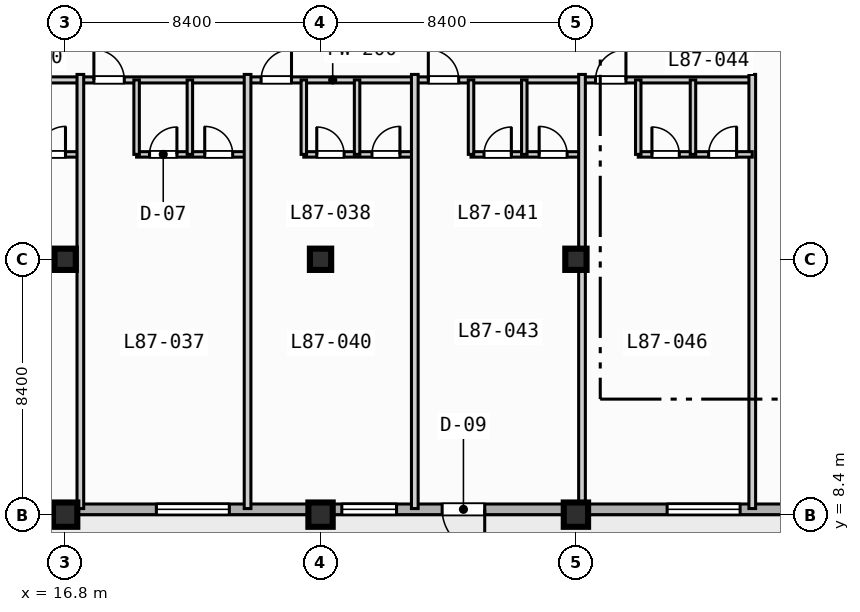
"""IFC4 building model, lengths in metres.
Left out: names, types, materials, properties, quantities, classifications, styles, units other than length and angle.
Written with IfcOpenShell. Run it as: python <this file> out.ifc"""

import sys

from ifc_helpers import new_model, si_unit, direction, frame, frame_2d, origin, origin_2d, place, context, subcontext, project, spatial, rectangle, extrude, element, fill, save


model = new_model("IFC4")
c1 = context("Model", 3, precision=1e-05, world=origin(), true_north=direction((0.0, 1.0)))
c2 = subcontext(c1, "Body", "Model", "MODEL_VIEW")
j1 = project(units=[si_unit("LENGTHUNIT", "METRE"), si_unit("PLANEANGLEUNIT", "RADIAN")], contexts=[c1])
p1 = place(None, origin())
s1 = spatial("IfcSite", under=j1, at=p1, CompositionType="ELEMENT")
p2 = place(p1, origin())
s2 = spatial("IfcBuilding", under=s1, at=p2, CompositionType="ELEMENT")
p3 = place(p2, frame((0.0, 0.0, 351.5)))
s3 = spatial("IfcBuildingStorey", under=s2, at=p3, CompositionType="ELEMENT", Elevation=351.5)
p4 = place(p3, frame((16.8, 8.4, 0.0), z_axis=(0.0, 0.0, 1.0), x_axis=(1.0, 0.0, 0.0)))
e1 = element("IfcColumn", 1, at=p4, inside=s3, PredefinedType="COLUMN", context=c2, shape_type="SweptSolid", body=[
    extrude(rectangle(XDim=0.8, YDim=0.8, at=origin_2d()), origin(), (0.0, 0.0, 1.0), 3.9),
])
p5 = place(p3, frame((16.8, 16.8, 0.0), z_axis=(0.0, 0.0, 1.0), x_axis=(1.0, 0.0, 0.0)))
e2 = element("IfcColumn", 2, at=p5, inside=s3, PredefinedType="COLUMN", context=c2, shape_type="SweptSolid", body=[
    extrude(rectangle(XDim=0.7, YDim=0.7, at=origin_2d()), origin(), (0.0, 0.0, 1.0), 3.9),
])
p6 = place(p3, frame((25.2, 8.4, 0.0), z_axis=(0.0, 0.0, 1.0), x_axis=(1.0, 0.0, 0.0)))
e3 = element("IfcColumn", 3, at=p6, inside=s3, PredefinedType="COLUMN", context=c2, shape_type="SweptSolid", body=[
    extrude(rectangle(XDim=0.8, YDim=0.8, at=origin_2d()), origin(), (0.0, 0.0, 1.0), 3.9),
])
p7 = place(p3, frame((25.2, 16.8, 0.0), z_axis=(0.0, 0.0, 1.0), x_axis=(1.0, 0.0, 0.0)))
e4 = element("IfcColumn", 4, at=p7, inside=s3, PredefinedType="COLUMN", context=c2, shape_type="SweptSolid", body=[
    extrude(rectangle(XDim=0.7, YDim=0.7, at=origin_2d()), origin(), (0.0, 0.0, 1.0), 3.9),
])
p8 = place(p3, frame((33.6, 8.4, 0.0), z_axis=(0.0, 0.0, 1.0), x_axis=(1.0, 0.0, 0.0)))
e5 = element("IfcColumn", 5, at=p8, inside=s3, PredefinedType="COLUMN", context=c2, shape_type="SweptSolid", body=[
    extrude(rectangle(XDim=0.8, YDim=0.8, at=origin_2d()), origin(), (0.0, 0.0, 1.0), 3.9),
])
p9 = place(p3, frame((33.6, 16.8, 0.0), z_axis=(0.0, 0.0, 1.0), x_axis=(1.0, 0.0, 0.0)))
e6 = element("IfcColumn", 6, at=p9, inside=s3, PredefinedType="COLUMN", context=c2, shape_type="SweptSolid", body=[
    extrude(rectangle(XDim=0.7, YDim=0.7, at=origin_2d()), origin(), (0.0, 0.0, 1.0), 3.9),
])
p10 = place(p3, frame((64.025, 8.575, 0.0), z_axis=(0.0, 0.0, 1.0), x_axis=(-1.0, 0.0, 0.0)))
e7 = element("IfcWall", 7, at=p10, inside=s3, PredefinedType="STANDARD", context=c2, shape_type="SweptSolid", body=[
    extrude(rectangle(XDim=52.45, YDim=0.35, at=frame_2d((26.225, 0.0))), origin(), (0.0, 0.0, 1.0), 3.67),
])
p11 = place(p10, frame((33.425, 0.0, 0.0)))
e8 = element("IfcOpeningElement", 8, at=p11, cuts=e7, PredefinedType="OPENING", context=c2, shape_type="SweptSolid", body=[
    extrude(rectangle(XDim=1.4, YDim=2.2, at=frame_2d((0.7, 1.1))), frame((0.0, 0.185, 0.0), z_axis=(0.0, -1.0, 0.0), x_axis=(1.0, 0.0, 0.0)), (0.0, 0.0, 1.0), 0.37),
])
p12 = place(p10, frame((41.825, 0.0, 0.85)))
e9 = element("IfcOpeningElement", 9, at=p12, cuts=e7, PredefinedType="OPENING", context=c2, shape_type="SweptSolid", body=[
    extrude(rectangle(XDim=2.4, YDim=1.95, at=frame_2d((1.2, 0.975))), frame((0.0, 0.185, 0.0), z_axis=(0.0, -1.0, 0.0), x_axis=(1.0, 0.0, 0.0)), (0.0, 0.0, 1.0), 0.37),
])
p13 = place(p10, frame((25.025, 0.0, 0.85)))
e10 = element("IfcOpeningElement", 10, at=p13, cuts=e7, PredefinedType="OPENING", context=c2, shape_type="SweptSolid", body=[
    extrude(rectangle(XDim=2.4, YDim=1.95, at=frame_2d((1.2, 0.975))), frame((0.0, 0.185, 0.0), z_axis=(0.0, -1.0, 0.0), x_axis=(1.0, 0.0, 0.0)), (0.0, 0.0, 1.0), 0.37),
])
p14 = place(p10, frame((16.925, 0.0, 0.85)))
e11 = element("IfcOpeningElement", 11, at=p14, cuts=e7, PredefinedType="OPENING", context=c2, shape_type="SweptSolid", body=[
    extrude(rectangle(XDim=1.8, YDim=1.8, at=frame_2d((0.9, 0.9))), frame((0.0, 0.185, 0.0), z_axis=(0.0, -1.0, 0.0), x_axis=(1.0, 0.0, 0.0)), (0.0, 0.0, 1.0), 0.37),
])
p15 = place(p10, frame((48.575, 0.0, 0.85)))
e12 = element("IfcOpeningElement", 12, at=p15, cuts=e7, PredefinedType="OPENING", context=c2, shape_type="SweptSolid", body=[
    extrude(rectangle(XDim=1.8, YDim=1.8, at=frame_2d((0.9, 0.9))), frame((0.0, 0.185, 0.0), z_axis=(0.0, -1.0, 0.0), x_axis=(1.0, 0.0, 0.0)), (0.0, 0.0, 1.0), 0.37),
])
p16 = place(p10, frame((36.325, 0.0, 0.85)))
e13 = element("IfcOpeningElement", 13, at=p16, cuts=e7, PredefinedType="OPENING", context=c2, shape_type="SweptSolid", body=[
    extrude(rectangle(XDim=1.8, YDim=1.8, at=frame_2d((0.9, 0.9))), frame((0.0, 0.185, 0.0), z_axis=(0.0, -1.0, 0.0), x_axis=(1.0, 0.0, 0.0)), (0.0, 0.0, 1.0), 0.37),
])
p17 = place(p3, frame((11.8, 22.7, 0.0), z_axis=(0.0, 0.0, 1.0), x_axis=(1.0, 0.0, 0.0)))
e14 = element("IfcWall", 14, at=p17, inside=s3, PredefinedType="PARTITIONING", context=c2, shape_type="SweptSolid", body=[
    extrude(rectangle(XDim=27.6, YDim=0.2, at=frame_2d((13.8, 0.0))), origin(), (0.0, 0.0, 1.0), 3.67),
])
p18 = place(p17, frame((0.445, 0.0, 0.0)))
e15 = element("IfcOpeningElement", 15, at=p18, cuts=e14, PredefinedType="OPENING", context=c2, shape_type="SweptSolid", body=[
    extrude(rectangle(XDim=1.0, YDim=2.15, at=frame_2d((0.5, 1.075))), frame((0.0, 0.11, 0.0), z_axis=(0.0, -1.0, 0.0), x_axis=(1.0, 0.0, 0.0)), (0.0, 0.0, 1.0), 0.22),
])
p19 = place(p17, frame((5.945, 0.0, 0.0)))
e16 = element("IfcOpeningElement", 16, at=p19, cuts=e14, PredefinedType="OPENING", context=c2, shape_type="SweptSolid", body=[
    extrude(rectangle(XDim=1.0, YDim=2.15, at=frame_2d((0.5, 1.075))), frame((0.0, 0.11, 0.0), z_axis=(0.0, -1.0, 0.0), x_axis=(1.0, 0.0, 0.0)), (0.0, 0.0, 1.0), 0.22),
])
p20 = place(p17, frame((11.445, 0.0, 0.0)))
e17 = element("IfcOpeningElement", 17, at=p20, cuts=e14, PredefinedType="OPENING", context=c2, shape_type="SweptSolid", body=[
    extrude(rectangle(XDim=1.0, YDim=2.15, at=frame_2d((0.5, 1.075))), frame((0.0, 0.11, 0.0), z_axis=(0.0, -1.0, 0.0), x_axis=(1.0, 0.0, 0.0)), (0.0, 0.0, 1.0), 0.22),
])
p21 = place(p17, frame((16.945, 0.0, 0.0)))
e18 = element("IfcOpeningElement", 18, at=p21, cuts=e14, PredefinedType="OPENING", context=c2, shape_type="SweptSolid", body=[
    extrude(rectangle(XDim=1.0, YDim=2.15, at=frame_2d((0.5, 1.075))), frame((0.0, 0.11, 0.0), z_axis=(0.0, -1.0, 0.0), x_axis=(1.0, 0.0, 0.0)), (0.0, 0.0, 1.0), 0.22),
])
p22 = place(p17, frame((22.445, 0.0, 0.0)))
e19 = element("IfcOpeningElement", 19, at=p22, cuts=e14, PredefinedType="OPENING", context=c2, shape_type="SweptSolid", body=[
    extrude(rectangle(XDim=1.0, YDim=2.15, at=frame_2d((0.5, 1.075))), frame((0.0, 0.11, 0.0), z_axis=(0.0, -1.0, 0.0), x_axis=(1.0, 0.0, 0.0)), (0.0, 0.0, 1.0), 0.22),
])
p23 = place(p3, frame((13.65, 20.25, 0.0), z_axis=(0.0, 0.0, 1.0), x_axis=(1.0, 0.0, 0.0)))
e20 = element("IfcWall", 20, at=p23, inside=s3, PredefinedType="PLUMBINGWALL", context=c2, shape_type="SweptSolid", body=[
    extrude(rectangle(XDim=3.65, YDim=0.18, at=frame_2d((1.825, 0.0))), origin(), (0.0, 0.0, 1.0), 3.67),
])
p24 = place(p23, frame((0.426, 0.0, 0.0)))
e21 = element("IfcOpeningElement", 21, at=p24, cuts=e20, PredefinedType="OPENING", context=c2, shape_type="SweptSolid", body=[
    extrude(rectangle(XDim=0.9, YDim=2.1, at=frame_2d((0.45, 1.05))), frame((0.0, 0.1, 0.0), z_axis=(0.0, -1.0, 0.0), x_axis=(1.0, 0.0, 0.0)), (0.0, 0.0, 1.0), 0.2),
])
p25 = place(p23, frame((2.241, 0.0, 0.0)))
e22 = element("IfcOpeningElement", 22, at=p25, cuts=e20, PredefinedType="OPENING", context=c2, shape_type="SweptSolid", body=[
    extrude(rectangle(XDim=0.92, YDim=2.1, at=frame_2d((0.46, 1.05))), frame((0.0, 0.1, 0.0), z_axis=(0.0, -1.0, 0.0), x_axis=(1.0, 0.0, 0.0)), (0.0, 0.0, 1.0), 0.2),
])
p26 = place(p3, frame((17.3, 8.6, 0.0), z_axis=(0.0, 0.0, 1.0), x_axis=(0.0, 1.0, 0.0)))
e23 = element("IfcWall", 23, at=p26, inside=s3, PredefinedType="PARTITIONING", context=c2, shape_type="SweptSolid", body=[
    extrude(rectangle(XDim=14.28, YDim=0.22, at=frame_2d((7.14, 0.0))), origin(), (0.0, 0.0, 1.0), 3.67),
])
p27 = place(p3, frame((19.15, 20.25, 0.0), z_axis=(0.0, 0.0, 1.0), x_axis=(1.0, 0.0, 0.0)))
e24 = element("IfcWall", 24, at=p27, inside=s3, PredefinedType="PLUMBINGWALL", context=c2, shape_type="SweptSolid", body=[
    extrude(rectangle(XDim=3.65, YDim=0.18, at=frame_2d((1.825, 0.0))), origin(), (0.0, 0.0, 1.0), 3.67),
])
p28 = place(p27, frame((0.426, 0.0, 0.0)))
e25 = element("IfcOpeningElement", 25, at=p28, cuts=e24, PredefinedType="OPENING", context=c2, shape_type="SweptSolid", body=[
    extrude(rectangle(XDim=0.9, YDim=2.1, at=frame_2d((0.45, 1.05))), frame((0.0, 0.1, 0.0), z_axis=(0.0, -1.0, 0.0), x_axis=(1.0, 0.0, 0.0)), (0.0, 0.0, 1.0), 0.2),
])
p29 = place(p27, frame((2.241, 0.0, 0.0)))
e26 = element("IfcOpeningElement", 26, at=p29, cuts=e24, PredefinedType="OPENING", context=c2, shape_type="SweptSolid", body=[
    extrude(rectangle(XDim=0.92, YDim=2.1, at=frame_2d((0.46, 1.05))), frame((0.0, 0.1, 0.0), z_axis=(0.0, -1.0, 0.0), x_axis=(1.0, 0.0, 0.0)), (0.0, 0.0, 1.0), 0.2),
])
p30 = place(p3, frame((19.15, 20.25, 0.0), z_axis=(0.0, 0.0, 1.0), x_axis=(0.0, 1.0, 0.0)))
e27 = element("IfcWall", 27, at=p30, inside=s3, PredefinedType="PLUMBINGWALL", context=c2, shape_type="SweptSolid", body=[
    extrude(rectangle(XDim=2.45, YDim=0.18, at=frame_2d((1.225, 0.0))), origin(), (0.0, 0.0, 1.0), 3.67),
])
p31 = place(p3, frame((20.902, 20.25, 0.0), z_axis=(0.0, 0.0, 1.0), x_axis=(0.0, 1.0, 0.0)))
e28 = element("IfcWall", 28, at=p31, inside=s3, PredefinedType="PLUMBINGWALL", context=c2, shape_type="SweptSolid", body=[
    extrude(rectangle(XDim=2.45, YDim=0.18, at=frame_2d((1.225, 0.0))), origin(), (0.0, 0.0, 1.0), 3.253),
])
p32 = place(p3, frame((22.8, 8.6, 0.0), z_axis=(0.0, 0.0, 1.0), x_axis=(0.0, 1.0, 0.0)))
e29 = element("IfcWall", 29, at=p32, inside=s3, PredefinedType="PARTITIONING", context=c2, shape_type="SweptSolid", body=[
    extrude(rectangle(XDim=14.28, YDim=0.22, at=frame_2d((7.14, 0.0))), origin(), (0.0, 0.0, 1.0), 3.67),
])
p33 = place(p3, frame((24.65, 20.25, 0.0), z_axis=(0.0, 0.0, 1.0), x_axis=(1.0, 0.0, 0.0)))
e30 = element("IfcWall", 30, at=p33, inside=s3, PredefinedType="PLUMBINGWALL", context=c2, shape_type="SweptSolid", body=[
    extrude(rectangle(XDim=3.65, YDim=0.18, at=frame_2d((1.825, 0.0))), origin(), (0.0, 0.0, 1.0), 3.67),
])
p34 = place(p33, frame((0.426, 0.0, 0.0)))
e31 = element("IfcOpeningElement", 31, at=p34, cuts=e30, PredefinedType="OPENING", context=c2, shape_type="SweptSolid", body=[
    extrude(rectangle(XDim=0.9, YDim=2.1, at=frame_2d((0.45, 1.05))), frame((0.0, 0.1, 0.0), z_axis=(0.0, -1.0, 0.0), x_axis=(1.0, 0.0, 0.0)), (0.0, 0.0, 1.0), 0.2),
])
p35 = place(p33, frame((2.241, 0.0, 0.0)))
e32 = element("IfcOpeningElement", 32, at=p35, cuts=e30, PredefinedType="OPENING", context=c2, shape_type="SweptSolid", body=[
    extrude(rectangle(XDim=0.92, YDim=2.1, at=frame_2d((0.46, 1.05))), frame((0.0, 0.1, 0.0), z_axis=(0.0, -1.0, 0.0), x_axis=(1.0, 0.0, 0.0)), (0.0, 0.0, 1.0), 0.2),
])
for number, where, z_axis, x_axis in (
    (33, (24.65, 20.25, 0.0), (0.0, 0.0, 1.0), (0.0, 1.0, 0.0)),
    (34, (26.402, 20.25, 0.0), (0.0, 0.0, 1.0), (0.0, 1.0, 0.0)),
):
    element("IfcWall", number, at=place(p3, frame(where, z_axis=z_axis, x_axis=x_axis)), inside=s3, PredefinedType="PLUMBINGWALL", context=c2, shape_type="SweptSolid", body=[
        extrude(rectangle(XDim=2.45, YDim=0.18, at=frame_2d((1.225, 0.0))), origin(), (0.0, 0.0, 1.0), 3.67),
    ])
p36 = place(p3, frame((28.3, 8.6, 0.0), z_axis=(0.0, 0.0, 1.0), x_axis=(0.0, 1.0, 0.0)))
e35 = element("IfcWall", 35, at=p36, inside=s3, PredefinedType="PARTITIONING", context=c2, shape_type="SweptSolid", body=[
    extrude(rectangle(XDim=14.28, YDim=0.22, at=frame_2d((7.14, 0.0))), origin(), (0.0, 0.0, 1.0), 3.67),
])
p37 = place(p3, frame((30.15, 20.25, 0.0), z_axis=(0.0, 0.0, 1.0), x_axis=(1.0, 0.0, 0.0)))
e36 = element("IfcWall", 36, at=p37, inside=s3, PredefinedType="PLUMBINGWALL", context=c2, shape_type="SweptSolid", body=[
    extrude(rectangle(XDim=3.65, YDim=0.18, at=frame_2d((1.825, 0.0))), origin(), (0.0, 0.0, 1.0), 3.67),
])
p38 = place(p37, frame((0.426, 0.0, 0.0)))
e37 = element("IfcOpeningElement", 37, at=p38, cuts=e36, PredefinedType="OPENING", context=c2, shape_type="SweptSolid", body=[
    extrude(rectangle(XDim=0.9, YDim=2.1, at=frame_2d((0.45, 1.05))), frame((0.0, 0.1, 0.0), z_axis=(0.0, -1.0, 0.0), x_axis=(1.0, 0.0, 0.0)), (0.0, 0.0, 1.0), 0.2),
])
p39 = place(p37, frame((2.241, 0.0, 0.0)))
e38 = element("IfcOpeningElement", 38, at=p39, cuts=e36, PredefinedType="OPENING", context=c2, shape_type="SweptSolid", body=[
    extrude(rectangle(XDim=0.92, YDim=2.1, at=frame_2d((0.46, 1.05))), frame((0.0, 0.1, 0.0), z_axis=(0.0, -1.0, 0.0), x_axis=(1.0, 0.0, 0.0)), (0.0, 0.0, 1.0), 0.2),
])
for number, where, z_axis, x_axis in (
    (39, (30.15, 20.25, 0.0), (0.0, 0.0, 1.0), (0.0, 1.0, 0.0)),
    (40, (31.902, 20.25, 0.0), (0.0, 0.0, 1.0), (0.0, 1.0, 0.0)),
):
    element("IfcWall", number, at=place(p3, frame(where, z_axis=z_axis, x_axis=x_axis)), inside=s3, PredefinedType="PLUMBINGWALL", context=c2, shape_type="SweptSolid", body=[
        extrude(rectangle(XDim=2.45, YDim=0.18, at=frame_2d((1.225, 0.0))), origin(), (0.0, 0.0, 1.0), 3.67),
    ])
p40 = place(p3, frame((33.8, 8.6, 0.0), z_axis=(0.0, 0.0, 1.0), x_axis=(0.0, 1.0, 0.0)))
e41 = element("IfcWall", 41, at=p40, inside=s3, PredefinedType="PARTITIONING", context=c2, shape_type="SweptSolid", body=[
    extrude(rectangle(XDim=14.28, YDim=0.22, at=frame_2d((7.14, 0.0))), origin(), (0.0, 0.0, 1.0), 3.07),
])
p41 = place(p3, frame((39.4, 8.6, 0.0), z_axis=(0.0, 0.0, 1.0), x_axis=(0.0, 1.0, 0.0)))
e42 = element("IfcWall", 42, at=p41, inside=s3, PredefinedType="PARTITIONING", context=c2, shape_type="SweptSolid", body=[
    extrude(rectangle(XDim=14.28, YDim=0.22, at=frame_2d((7.14, 0.0))), origin(), (0.0, 0.0, 1.0), 3.67),
])
p42 = place(p3, frame((35.65, 20.25, 0.0), z_axis=(0.0, 0.0, 1.0), x_axis=(1.0, 0.0, 0.0)))
e43 = element("IfcWall", 43, at=p42, inside=s3, PredefinedType="PLUMBINGWALL", context=c2, shape_type="SweptSolid", body=[
    extrude(rectangle(XDim=3.75, YDim=0.18, at=frame_2d((1.875, 0.0))), origin(), (0.0, 0.0, 1.0), 3.67),
])
p43 = place(p42, frame((0.45, 0.0, 0.0)))
e44 = element("IfcOpeningElement", 44, at=p43, cuts=e43, PredefinedType="OPENING", context=c2, shape_type="SweptSolid", body=[
    extrude(rectangle(XDim=0.9, YDim=2.1, at=frame_2d((0.45, 1.05))), frame((0.0, 0.1, 0.0), z_axis=(0.0, -1.0, 0.0), x_axis=(1.0, 0.0, 0.0)), (0.0, 0.0, 1.0), 0.2),
])
p44 = place(p42, frame((2.315, 0.0, 0.0)))
e45 = element("IfcOpeningElement", 45, at=p44, cuts=e43, PredefinedType="OPENING", context=c2, shape_type="SweptSolid", body=[
    extrude(rectangle(XDim=0.92, YDim=2.1, at=frame_2d((0.46, 1.05))), frame((0.0, 0.1, 0.0), z_axis=(0.0, -1.0, 0.0), x_axis=(1.0, 0.0, 0.0)), (0.0, 0.0, 1.0), 0.2),
])
for number, where, z_axis, x_axis in (
    (46, (35.65, 20.25, 0.0), (0.0, 0.0, 1.0), (0.0, 1.0, 0.0)),
    (47, (37.45, 20.25, 0.0), (0.0, 0.0, 1.0), (0.0, 1.0, 0.0)),
):
    element("IfcWall", number, at=place(p3, frame(where, z_axis=z_axis, x_axis=x_axis)), inside=s3, PredefinedType="PLUMBINGWALL", context=c2, shape_type="SweptSolid", body=[
        extrude(rectangle(XDim=2.45, YDim=0.18, at=frame_2d((1.225, 0.0))), origin(), (0.0, 0.0, 1.0), 3.67),
    ])
p45 = place(p11, origin())
e48 = element("IfcDoor", 48, at=p45, inside=s3, OperationType="SINGLE_SWING_LEFT", PredefinedType="DOOR", context=c2, shape_type="SweptSolid", body=[
    extrude(rectangle(XDim=1.4, YDim=2.2, at=frame_2d((0.7, 1.1))), frame((0.0, 0.025, 0.0), z_axis=(0.0, -1.0, 0.0), x_axis=(1.0, 0.0, 0.0)), (0.0, 0.0, 1.0), 0.05),
])
fill(e8, e48)
p46 = place(p12, origin())
e49 = element("IfcWindow", 49, at=p46, inside=s3, PartitioningType="SINGLE_PANEL", PredefinedType="WINDOW", context=c2, shape_type="SweptSolid", body=[
    extrude(rectangle(XDim=2.4, YDim=1.95, at=frame_2d((1.2, 0.975))), frame((0.0, 0.03, 0.0), z_axis=(0.0, -1.0, 0.0), x_axis=(1.0, 0.0, 0.0)), (0.0, 0.0, 1.0), 0.06),
])
fill(e9, e49)
p47 = place(p13, origin())
e50 = element("IfcWindow", 50, at=p47, inside=s3, PartitioningType="SINGLE_PANEL", PredefinedType="WINDOW", context=c2, shape_type="SweptSolid", body=[
    extrude(rectangle(XDim=2.4, YDim=1.95, at=frame_2d((1.2, 0.975))), frame((0.0, 0.03, 0.0), z_axis=(0.0, -1.0, 0.0), x_axis=(1.0, 0.0, 0.0)), (0.0, 0.0, 1.0), 0.06),
])
fill(e10, e50)
p48 = place(p16, origin())
e51 = element("IfcWindow", 51, at=p48, inside=s3, PartitioningType="SINGLE_PANEL", PredefinedType="WINDOW", context=c2, shape_type="SweptSolid", body=[
    extrude(rectangle(XDim=1.8, YDim=1.8, at=frame_2d((0.9, 0.9))), frame((0.0, 0.03, 0.0), z_axis=(0.0, -1.0, 0.0), x_axis=(1.0, 0.0, 0.0)), (0.0, 0.0, 1.0), 0.06),
])
fill(e13, e51)
p49 = place(p19, origin())
e52 = element("IfcDoor", 52, at=p49, inside=s3, OperationType="SINGLE_SWING_LEFT", PredefinedType="DOOR", context=c2, shape_type="SweptSolid", body=[
    extrude(rectangle(XDim=1.0, YDim=2.15, at=frame_2d((0.5, 1.075))), frame((0.0, 0.025, 0.0), z_axis=(0.0, -1.0, 0.0), x_axis=(1.0, 0.0, 0.0)), (0.0, 0.0, 1.0), 0.05),
])
fill(e16, e52)
p50 = place(p20, origin())
e53 = element("IfcDoor", 53, at=p50, inside=s3, OperationType="SINGLE_SWING_RIGHT", PredefinedType="DOOR", context=c2, shape_type="SweptSolid", body=[
    extrude(rectangle(XDim=1.0, YDim=2.15, at=frame_2d((0.5, 1.075))), frame((0.0, 0.025, 0.0), z_axis=(0.0, -1.0, 0.0), x_axis=(1.0, 0.0, 0.0)), (0.0, 0.0, 1.0), 0.05),
])
fill(e17, e53)
p51 = place(p21, origin())
e54 = element("IfcDoor", 54, at=p51, inside=s3, OperationType="SINGLE_SWING_LEFT", PredefinedType="DOOR", context=c2, shape_type="SweptSolid", body=[
    extrude(rectangle(XDim=1.0, YDim=2.15, at=frame_2d((0.5, 1.075))), frame((0.0, 0.025, 0.0), z_axis=(0.0, -1.0, 0.0), x_axis=(1.0, 0.0, 0.0)), (0.0, 0.0, 1.0), 0.05),
])
fill(e18, e54)
p52 = place(p22, origin())
e55 = element("IfcDoor", 55, at=p52, inside=s3, OperationType="SINGLE_SWING_RIGHT", PredefinedType="DOOR", context=c2, shape_type="SweptSolid", body=[
    extrude(rectangle(XDim=1.0, YDim=2.15, at=frame_2d((0.5, 1.075))), frame((0.0, 0.025, 0.0), z_axis=(0.0, -1.0, 0.0), x_axis=(1.0, 0.0, 0.0)), (0.0, 0.0, 1.0), 0.05),
])
fill(e19, e55)
p53 = place(p25, origin())
e56 = element("IfcDoor", 56, at=p53, inside=s3, OperationType="SINGLE_SWING_RIGHT", PredefinedType="DOOR", context=c2, shape_type="SweptSolid", body=[
    extrude(rectangle(XDim=0.92, YDim=2.1, at=frame_2d((0.46, 1.05))), frame((0.0, 0.025, 0.0), z_axis=(0.0, -1.0, 0.0), x_axis=(1.0, 0.0, 0.0)), (0.0, 0.0, 1.0), 0.05),
])
fill(e22, e56)
p54 = place(p28, origin())
e57 = element("IfcDoor", 57, at=p54, inside=s3, OperationType="SINGLE_SWING_RIGHT", PredefinedType="DOOR", context=c2, shape_type="SweptSolid", body=[
    extrude(rectangle(XDim=0.9, YDim=2.1, at=frame_2d((0.45, 1.05))), frame((0.0, 0.025, 0.0), z_axis=(0.0, -1.0, 0.0), x_axis=(1.0, 0.0, 0.0)), (0.0, 0.0, 1.0), 0.05),
])
fill(e25, e57)
p55 = place(p29, origin())
e58 = element("IfcDoor", 58, at=p55, inside=s3, OperationType="SINGLE_SWING_LEFT", PredefinedType="DOOR", context=c2, shape_type="SweptSolid", body=[
    extrude(rectangle(XDim=0.92, YDim=2.1, at=frame_2d((0.46, 1.05))), frame((0.0, 0.025, 0.0), z_axis=(0.0, -1.0, 0.0), x_axis=(1.0, 0.0, 0.0)), (0.0, 0.0, 1.0), 0.05),
])
fill(e26, e58)
p56 = place(p34, origin())
e59 = element("IfcDoor", 59, at=p56, inside=s3, OperationType="SINGLE_SWING_LEFT", PredefinedType="DOOR", context=c2, shape_type="SweptSolid", body=[
    extrude(rectangle(XDim=0.9, YDim=2.1, at=frame_2d((0.45, 1.05))), frame((0.0, 0.025, 0.0), z_axis=(0.0, -1.0, 0.0), x_axis=(1.0, 0.0, 0.0)), (0.0, 0.0, 1.0), 0.05),
])
fill(e31, e59)
p57 = place(p35, origin())
e60 = element("IfcDoor", 60, at=p57, inside=s3, OperationType="SINGLE_SWING_RIGHT", PredefinedType="DOOR", context=c2, shape_type="SweptSolid", body=[
    extrude(rectangle(XDim=0.92, YDim=2.1, at=frame_2d((0.46, 1.05))), frame((0.0, 0.025, 0.0), z_axis=(0.0, -1.0, 0.0), x_axis=(1.0, 0.0, 0.0)), (0.0, 0.0, 1.0), 0.05),
])
fill(e32, e60)
p58 = place(p38, origin())
e61 = element("IfcDoor", 61, at=p58, inside=s3, OperationType="SINGLE_SWING_RIGHT", PredefinedType="DOOR", context=c2, shape_type="SweptSolid", body=[
    extrude(rectangle(XDim=0.9, YDim=2.1, at=frame_2d((0.45, 1.05))), frame((0.0, 0.025, 0.0), z_axis=(0.0, -1.0, 0.0), x_axis=(1.0, 0.0, 0.0)), (0.0, 0.0, 1.0), 0.05),
])
fill(e37, e61)
p59 = place(p39, origin())
e62 = element("IfcDoor", 62, at=p59, inside=s3, OperationType="SINGLE_SWING_LEFT", PredefinedType="DOOR", context=c2, shape_type="SweptSolid", body=[
    extrude(rectangle(XDim=0.92, YDim=2.1, at=frame_2d((0.46, 1.05))), frame((0.0, 0.025, 0.0), z_axis=(0.0, -1.0, 0.0), x_axis=(1.0, 0.0, 0.0)), (0.0, 0.0, 1.0), 0.05),
])
fill(e38, e62)
p60 = place(p43, origin())
e63 = element("IfcDoor", 63, at=p60, inside=s3, OperationType="SINGLE_SWING_LEFT", PredefinedType="DOOR", context=c2, shape_type="SweptSolid", body=[
    extrude(rectangle(XDim=0.9, YDim=2.1, at=frame_2d((0.45, 1.05))), frame((0.0, 0.025, 0.0), z_axis=(0.0, -1.0, 0.0), x_axis=(1.0, 0.0, 0.0)), (0.0, 0.0, 1.0), 0.05),
])
fill(e44, e63)
p61 = place(p44, origin())
e64 = element("IfcDoor", 64, at=p61, inside=s3, OperationType="SINGLE_SWING_RIGHT", PredefinedType="DOOR", context=c2, shape_type="SweptSolid", body=[
    extrude(rectangle(XDim=0.92, YDim=2.1, at=frame_2d((0.46, 1.05))), frame((0.0, 0.025, 0.0), z_axis=(0.0, -1.0, 0.0), x_axis=(1.0, 0.0, 0.0)), (0.0, 0.0, 1.0), 0.05),
])
fill(e45, e64)
save(model, sys.argv[1])
